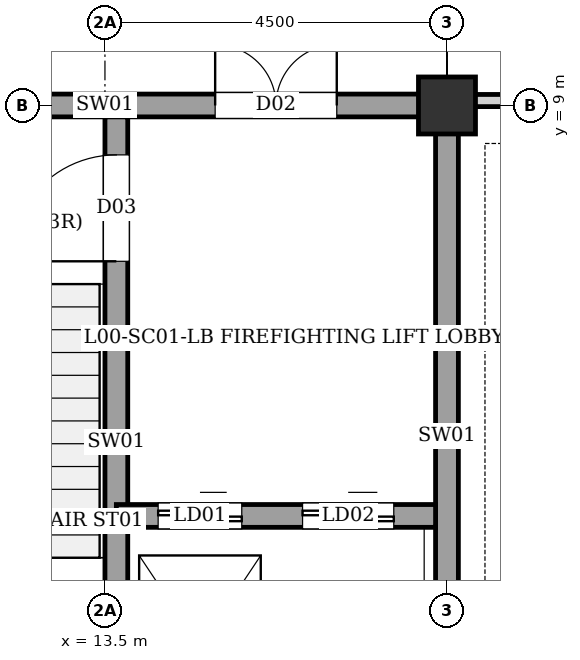
"""IFC4 building model, lengths in metres.
Left out: names, types, materials, properties, quantities, classifications, styles, units other than length and angle.
Written with IfcOpenShell. Run it as: python <this file> out.ifc"""

import sys

from ifc_helpers import new_model, si_unit, direction, frame, frame_2d, origin, origin_2d, place, context, subcontext, project, spatial, rectangle, extrude, element, fill, save


model = new_model("IFC4")
c1 = context("Model", 3, precision=1e-05, world=origin(), true_north=direction((0.0, 1.0)))
c2 = subcontext(c1, "Body", "Model", "MODEL_VIEW")
j1 = project(units=[si_unit("LENGTHUNIT", "METRE"), si_unit("PLANEANGLEUNIT", "RADIAN")], contexts=[c1])
p1 = place(None, origin())
s1 = spatial("IfcSite", under=j1, at=p1, CompositionType="ELEMENT")
p2 = place(p1, origin())
s2 = spatial("IfcBuilding", under=s1, at=p2, CompositionType="ELEMENT")
p3 = place(p2, origin())
s3 = spatial("IfcBuildingStorey", under=s2, at=p3, CompositionType="ELEMENT", Elevation=0.0)
p4 = place(p3, frame((18.0, 9.0, 0.0), z_axis=(0.0, 0.0, 1.0), x_axis=(1.0, 0.0, 0.0)))
e1 = element("IfcColumn", 1, at=p4, inside=s3, PredefinedType="COLUMN", context=c2, shape_type="SweptSolid", body=[
    extrude(rectangle(XDim=0.75, YDim=0.75, at=origin_2d()), origin(), (0.0, 0.0, 1.0), 4.32),
])
p5 = place(p3, frame((18.0, 0.0, 0.0), z_axis=(0.0, 0.0, 1.0), x_axis=(0.0, 1.0, 0.0)))
e2 = element("IfcWall", 2, at=p5, inside=s3, PredefinedType="SHEAR", context=c2, shape_type="SweptSolid", body=[
    extrude(rectangle(XDim=9.0, YDim=0.3, at=frame_2d((4.5, 0.0))), origin(), (0.0, 0.0, 1.0), 4.055),
])
p6 = place(p3, frame((9.0, 9.0, 0.0), z_axis=(0.0, 0.0, 1.0), x_axis=(1.0, 0.0, 0.0)))
e3 = element("IfcWall", 3, at=p6, inside=s3, PredefinedType="SHEAR", context=c2, shape_type="SweptSolid", body=[
    extrude(rectangle(XDim=9.0, YDim=0.3, at=frame_2d((4.5, 0.0))), origin(), (0.0, 0.0, 1.0), 4.055),
])
p7 = place(p6, frame((5.95, 0.0, 0.0)))
e4 = element("IfcOpeningElement", 4, at=p7, cuts=e3, PredefinedType="OPENING", context=c2, shape_type="SweptSolid", body=[
    extrude(rectangle(XDim=1.6, YDim=2.1, at=frame_2d((0.8, 1.05))), frame((0.0, 0.16, 0.0), z_axis=(0.0, -1.0, 0.0), x_axis=(1.0, 0.0, 0.0)), (0.0, 0.0, 1.0), 0.32),
])
p8 = place(p3, frame((13.65, 0.15, 0.0), z_axis=(0.0, 0.0, 1.0), x_axis=(0.0, 1.0, 0.0)))
e5 = element("IfcWall", 5, at=p8, inside=s3, PredefinedType="SHEAR", context=c2, shape_type="SweptSolid", body=[
    extrude(rectangle(XDim=8.7, YDim=0.3, at=frame_2d((4.35, 0.0))), origin(), (0.0, 0.0, 1.0), 4.055),
])
p9 = place(p8, frame((6.8, 0.0, 0.0)))
e6 = element("IfcOpeningElement", 6, at=p9, cuts=e5, PredefinedType="OPENING", context=c2, shape_type="SweptSolid", body=[
    extrude(rectangle(XDim=1.4, YDim=2.02, at=frame_2d((0.7, 1.01))), frame((0.0, 0.16, 0.0), z_axis=(0.0, -1.0, 0.0), x_axis=(1.0, 0.0, 0.0)), (0.0, 0.0, 1.0), 0.32),
])
p10 = place(p3, frame((13.65, 3.6, 0.0), z_axis=(0.0, 0.0, 1.0), x_axis=(1.0, 0.0, 0.0)))
e7 = element("IfcWall", 7, at=p10, inside=s3, PredefinedType="SHEAR", context=c2, shape_type="SweptSolid", body=[
    extrude(rectangle(XDim=4.2, YDim=0.3, at=frame_2d((2.1, 0.0))), origin(), (0.0, 0.0, 1.0), 4.055),
])
p11 = place(p10, frame((0.55, 0.0, 0.0)))
e8 = element("IfcOpeningElement", 8, at=p11, cuts=e7, PredefinedType="OPENING", context=c2, shape_type="SweptSolid", body=[
    extrude(rectangle(XDim=1.1, YDim=2.1, at=frame_2d((0.55, 1.05))), frame((0.0, 0.16, 0.0), z_axis=(0.0, -1.0, 0.0), x_axis=(1.0, 0.0, 0.0)), (0.0, 0.0, 1.0), 0.32),
])
p12 = place(p10, frame((2.45, 0.0, 0.0)))
e9 = element("IfcOpeningElement", 9, at=p12, cuts=e7, PredefinedType="OPENING", context=c2, shape_type="SweptSolid", body=[
    extrude(rectangle(XDim=1.2, YDim=2.2, at=frame_2d((0.6, 1.1))), frame((0.0, 0.16, 0.0), z_axis=(0.0, -1.0, 0.0), x_axis=(1.0, 0.0, 0.0)), (0.0, 0.0, 1.0), 0.32),
])
p13 = place(p3, frame((18.155, 9.065, 0.0), z_axis=(0.0, 0.0, 1.0), x_axis=(1.0, 0.0, 0.0)))
e10 = element("IfcWall", 10, at=p13, inside=s3, PredefinedType="PARTITIONING", context=c2, shape_type="SweptSolid", body=[
    extrude(rectangle(XDim=15.44, YDim=0.16, at=frame_2d((7.72, 0.0))), origin(), (0.0, 0.0, 1.0), 4.055),
])
p14 = place(p13, frame((12.54, 0.0, 0.0)))
e11 = element("IfcOpeningElement", 11, at=p14, cuts=e10, PredefinedType="OPENING", context=c2, shape_type="SweptSolid", body=[
    extrude(rectangle(XDim=1.0, YDim=2.1, at=frame_2d((0.5, 1.05))), frame((0.0, 0.09, 0.0), z_axis=(0.0, -1.0, 0.0), x_axis=(1.0, 0.0, 0.0)), (0.0, 0.0, 1.0), 0.18),
])
p15 = place(p7, origin())
e12 = element("IfcDoor", 12, at=p15, inside=s3, OperationType="DOUBLE_DOOR_SINGLE_SWING", PredefinedType="DOOR", context=c2, shape_type="SweptSolid", body=[
    extrude(rectangle(XDim=1.6, YDim=2.1, at=frame_2d((0.8, 1.05))), frame((0.0, 0.025, 0.0), z_axis=(0.0, -1.0, 0.0), x_axis=(1.0, 0.0, 0.0)), (0.0, 0.0, 1.0), 0.05),
])
fill(e4, e12)
p16 = place(p9, origin())
e13 = element("IfcDoor", 13, at=p16, inside=s3, OperationType="SINGLE_SWING_LEFT", PredefinedType="DOOR", context=c2, shape_type="SweptSolid", body=[
    extrude(rectangle(XDim=1.4, YDim=2.02, at=frame_2d((0.7, 1.01))), frame((0.0, 0.025, 0.0), z_axis=(0.0, -1.0, 0.0), x_axis=(1.0, 0.0, 0.0)), (0.0, 0.0, 1.0), 0.05),
])
fill(e6, e13)
p17 = place(p11, origin())
e14 = element("IfcDoor", 14, at=p17, inside=s3, OperationType="DOUBLE_DOOR_SLIDING", PredefinedType="DOOR", context=c2, shape_type="SweptSolid", body=[
    extrude(rectangle(XDim=1.1, YDim=2.1, at=frame_2d((0.55, 1.05))), frame((0.0, 0.025, 0.0), z_axis=(0.0, -1.0, 0.0), x_axis=(1.0, 0.0, 0.0)), (0.0, 0.0, 1.0), 0.05),
])
fill(e8, e14)
p18 = place(p12, origin())
e15 = element("IfcDoor", 15, at=p18, inside=s3, OperationType="DOUBLE_DOOR_SLIDING", PredefinedType="DOOR", context=c2, shape_type="SweptSolid", body=[
    extrude(rectangle(XDim=1.2, YDim=2.2, at=frame_2d((0.6, 1.1))), frame((0.0, 0.025, 0.0), z_axis=(0.0, -1.0, 0.0), x_axis=(1.0, 0.0, 0.0)), (0.0, 0.0, 1.0), 0.05),
])
fill(e9, e15)
save(model, sys.argv[1])
